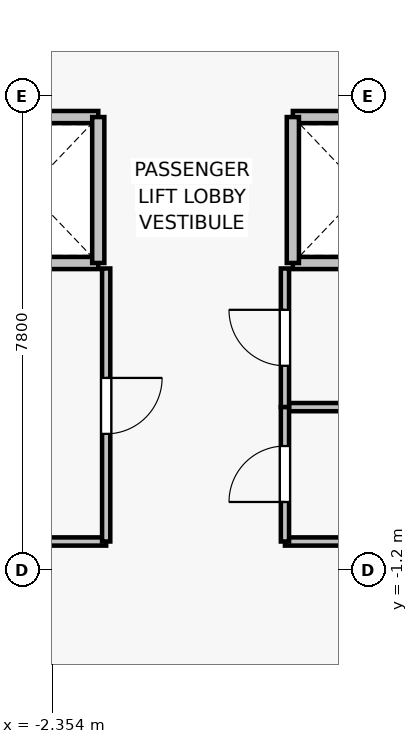
"""IFC4 building model, lengths in metres.
Left out: names, types, materials, properties, quantities, classifications, styles, units other than length and angle.
Written with IfcOpenShell. Run it as: python <this file> out.ifc"""

import sys

from ifc_helpers import new_model, si_unit, direction, frame, frame_2d, origin, place, context, subcontext, project, spatial, rectangle, extrude, source, transform, mapped, element, fill, save


model = new_model("IFC4")
c1 = context("Model", 3, precision=1e-05, world=origin(), true_north=direction((0.0, 1.0)))
c2 = subcontext(c1, "Body", "Model", "MODEL_VIEW")
j1 = project(units=[si_unit("LENGTHUNIT", "METRE"), si_unit("PLANEANGLEUNIT", "RADIAN")], contexts=[c1])
p1 = place(None, origin())
s1 = spatial("IfcSite", under=j1, at=p1, CompositionType="ELEMENT")
p2 = place(p1, origin())
s2 = spatial("IfcBuilding", under=s1, at=p2, CompositionType="ELEMENT")
p3 = place(p2, frame((0.0, 0.0, 37.3)))
s3 = spatial("IfcBuildingStorey", under=s2, at=p3, CompositionType="ELEMENT", Elevation=37.3)
for number, where, z_axis, x_axis in (
    (1, (-1.6, 3.85, 0.0), (0.0, 0.0, 1.0), (-1.0, 0.0, 0.0)),
    (2, (-3.9, 6.25, 0.0), (0.0, 0.0, 1.0), (1.0, 0.0, 0.0)),
):
    element("IfcWall", number, at=place(p3, frame(where, z_axis=z_axis, x_axis=x_axis)), inside=s3, PredefinedType="SOLIDWALL", context=c2, shape_type="SweptSolid", body=[
        extrude(rectangle(XDim=2.3, YDim=0.2, at=frame_2d((1.15, 0.0))), origin(), (0.0, 0.0, 1.0), 3.075),
    ])
p4 = place(p3, frame((-1.6, 6.25, 0.0), z_axis=(0.0, 0.0, 1.0), x_axis=(0.0, -1.0, 0.0)))
e3 = element("IfcWall", 3, at=p4, inside=s3, PredefinedType="SOLIDWALL", context=c2, shape_type="SweptSolid", body=[
    extrude(rectangle(XDim=2.4, YDim=0.2, at=frame_2d((1.2, 0.0))), origin(), (0.0, 0.0, 1.0), 3.075),
])
for number, where, z_axis, x_axis in (
    (4, (3.9, 3.85, 0.0), (0.0, 0.0, 1.0), (-1.0, 0.0, 0.0)),
    (5, (1.6, 6.25, 0.0), (0.0, 0.0, 1.0), (1.0, 0.0, 0.0)),
):
    element("IfcWall", number, at=place(p3, frame(where, z_axis=z_axis, x_axis=x_axis)), inside=s3, PredefinedType="SOLIDWALL", context=c2, shape_type="SweptSolid", body=[
        extrude(rectangle(XDim=2.3, YDim=0.2, at=frame_2d((1.15, 0.0))), origin(), (0.0, 0.0, 1.0), 3.075),
    ])
p5 = place(p3, frame((1.6, 3.85, 0.0), z_axis=(0.0, 0.0, 1.0), x_axis=(0.0, 1.0, 0.0)))
e6 = element("IfcWall", 6, at=p5, inside=s3, PredefinedType="SOLIDWALL", context=c2, shape_type="SweptSolid", body=[
    extrude(rectangle(XDim=2.4, YDim=0.2, at=frame_2d((1.2, 0.0))), origin(), (0.0, 0.0, 1.0), 3.075),
])
p6 = place(p3, frame((-1.47, -0.73, 0.0), z_axis=(0.0, 0.0, 1.0), x_axis=(-1.0, 0.0, 0.0)))
e7 = element("IfcWall", 7, at=p6, inside=s3, PredefinedType="PARTITIONING", context=c2, shape_type="SweptSolid", body=[
    extrude(rectangle(XDim=5.11, YDim=0.135, at=frame_2d((2.555, 0.0))), origin(), (0.0, 0.0, 1.0), 3.075),
])
p7 = place(p3, frame((-1.47, 3.76, 0.0), z_axis=(0.0, 0.0, 1.0), x_axis=(0.0, -1.0, 0.0)))
e8 = element("IfcWall", 8, at=p7, inside=s3, PredefinedType="PARTITIONING", context=c2, shape_type="SweptSolid", body=[
    extrude(rectangle(XDim=4.49, YDim=0.135, at=frame_2d((2.245, 0.0))), origin(), (0.0, 0.0, 1.0), 3.075),
])
p8 = place(p7, frame((1.8, 0.0, 0.0)))
e9 = element("IfcOpeningElement", 9, at=p8, cuts=e8, PredefinedType="OPENING", context=c2, shape_type="SweptSolid", body=[
    extrude(rectangle(XDim=0.92, YDim=2.1, at=frame_2d((0.46, 1.05))), frame((0.0, 0.077, 0.0), z_axis=(0.0, -1.0, 0.0), x_axis=(1.0, 0.0, 0.0)), (0.0, 0.0, 1.0), 0.155),
])
p9 = place(p3, frame((6.58, 1.48, 0.0), z_axis=(0.0, 0.0, 1.0), x_axis=(-1.0, 0.0, 0.0)))
e10 = element("IfcWall", 10, at=p9, inside=s3, PredefinedType="PARTITIONING", context=c2, shape_type="SweptSolid", body=[
    extrude(rectangle(XDim=5.11, YDim=0.135, at=frame_2d((2.555, 0.0))), origin(), (0.0, 0.0, 1.0), 3.075),
])
p10 = place(p3, frame((1.47, 1.48, 0.0), z_axis=(0.0, 0.0, 1.0), x_axis=(0.0, 1.0, 0.0)))
e11 = element("IfcWall", 11, at=p10, inside=s3, PredefinedType="PARTITIONING", context=c2, shape_type="SweptSolid", body=[
    extrude(rectangle(XDim=2.28, YDim=0.135, at=frame_2d((1.14, 0.0))), origin(), (0.0, 0.0, 1.0), 3.075),
])
p11 = place(p10, frame((0.68, 0.0, 0.0)))
e12 = element("IfcOpeningElement", 12, at=p11, cuts=e11, PredefinedType="OPENING", context=c2, shape_type="SweptSolid", body=[
    extrude(rectangle(XDim=0.92, YDim=2.1, at=frame_2d((0.46, 1.05))), frame((0.0, 0.077, 0.0), z_axis=(0.0, -1.0, 0.0), x_axis=(1.0, 0.0, 0.0)), (0.0, 0.0, 1.0), 0.155),
])
p12 = place(p3, frame((4.18, -0.73, 0.0), z_axis=(0.0, 0.0, 1.0), x_axis=(-1.0, 0.0, 0.0)))
e13 = element("IfcWall", 13, at=p12, inside=s3, PredefinedType="PARTITIONING", context=c2, shape_type="SweptSolid", body=[
    extrude(rectangle(XDim=2.71, YDim=0.135, at=frame_2d((1.355, 0.0))), origin(), (0.0, 0.0, 1.0), 3.075),
])
p13 = place(p3, frame((1.47, -0.73, 0.0), z_axis=(0.0, 0.0, 1.0), x_axis=(0.0, 1.0, 0.0)))
e14 = element("IfcWall", 14, at=p13, inside=s3, PredefinedType="PARTITIONING", context=c2, shape_type="SweptSolid", body=[
    extrude(rectangle(XDim=2.21, YDim=0.135, at=frame_2d((1.105, 0.0))), origin(), (0.0, 0.0, 1.0), 3.075),
])
p14 = place(p13, frame((0.65, 0.0, 0.0)))
e15 = element("IfcOpeningElement", 15, at=p14, cuts=e14, PredefinedType="OPENING", context=c2, shape_type="SweptSolid", body=[
    extrude(rectangle(XDim=0.92, YDim=2.1, at=frame_2d((0.46, 1.05))), frame((0.0, 0.077, 0.0), z_axis=(0.0, -1.0, 0.0), x_axis=(1.0, 0.0, 0.0)), (0.0, 0.0, 1.0), 0.155),
])
m1 = source(origin(), c2, "Body", "SweptSolid", [
    extrude(rectangle(XDim=0.92, YDim=2.1, at=frame_2d((0.46, 1.05))), frame((0.0, 0.025, 0.0), z_axis=(0.0, -1.0, 0.0), x_axis=(1.0, 0.0, 0.0)), (0.0, 0.0, 1.0), 0.05),
])
p15 = place(p8, origin())
e16 = element("IfcDoor", 16, at=p15, inside=s3, OperationType="SINGLE_SWING_LEFT", PredefinedType="DOOR", context=c2, shape_type="MappedRepresentation", body=[
    mapped(m1, transform((0.0, 0.0, 0.0), x_axis=(1.0, 0.0, 0.0), y_axis=(0.0, 1.0, 0.0), z_axis=(0.0, 0.0, 1.0), scale=1.0)),
])
fill(e9, e16)
p16 = place(p11, origin())
e17 = element("IfcDoor", 17, at=p16, inside=s3, OperationType="SINGLE_SWING_RIGHT", PredefinedType="DOOR", context=c2, shape_type="MappedRepresentation", body=[
    mapped(m1, transform((0.0, 0.0, 0.0), x_axis=(1.0, 0.0, 0.0), y_axis=(0.0, 1.0, 0.0), z_axis=(0.0, 0.0, 1.0), scale=1.0)),
])
fill(e12, e17)
p17 = place(p14, origin())
e18 = element("IfcDoor", 18, at=p17, inside=s3, OperationType="SINGLE_SWING_LEFT", PredefinedType="DOOR", context=c2, shape_type="MappedRepresentation", body=[
    mapped(m1, transform((0.0, 0.0, 0.0), x_axis=(1.0, 0.0, 0.0), y_axis=(0.0, 1.0, 0.0), z_axis=(0.0, 0.0, 1.0), scale=1.0)),
])
fill(e15, e18)
save(model, sys.argv[1])
